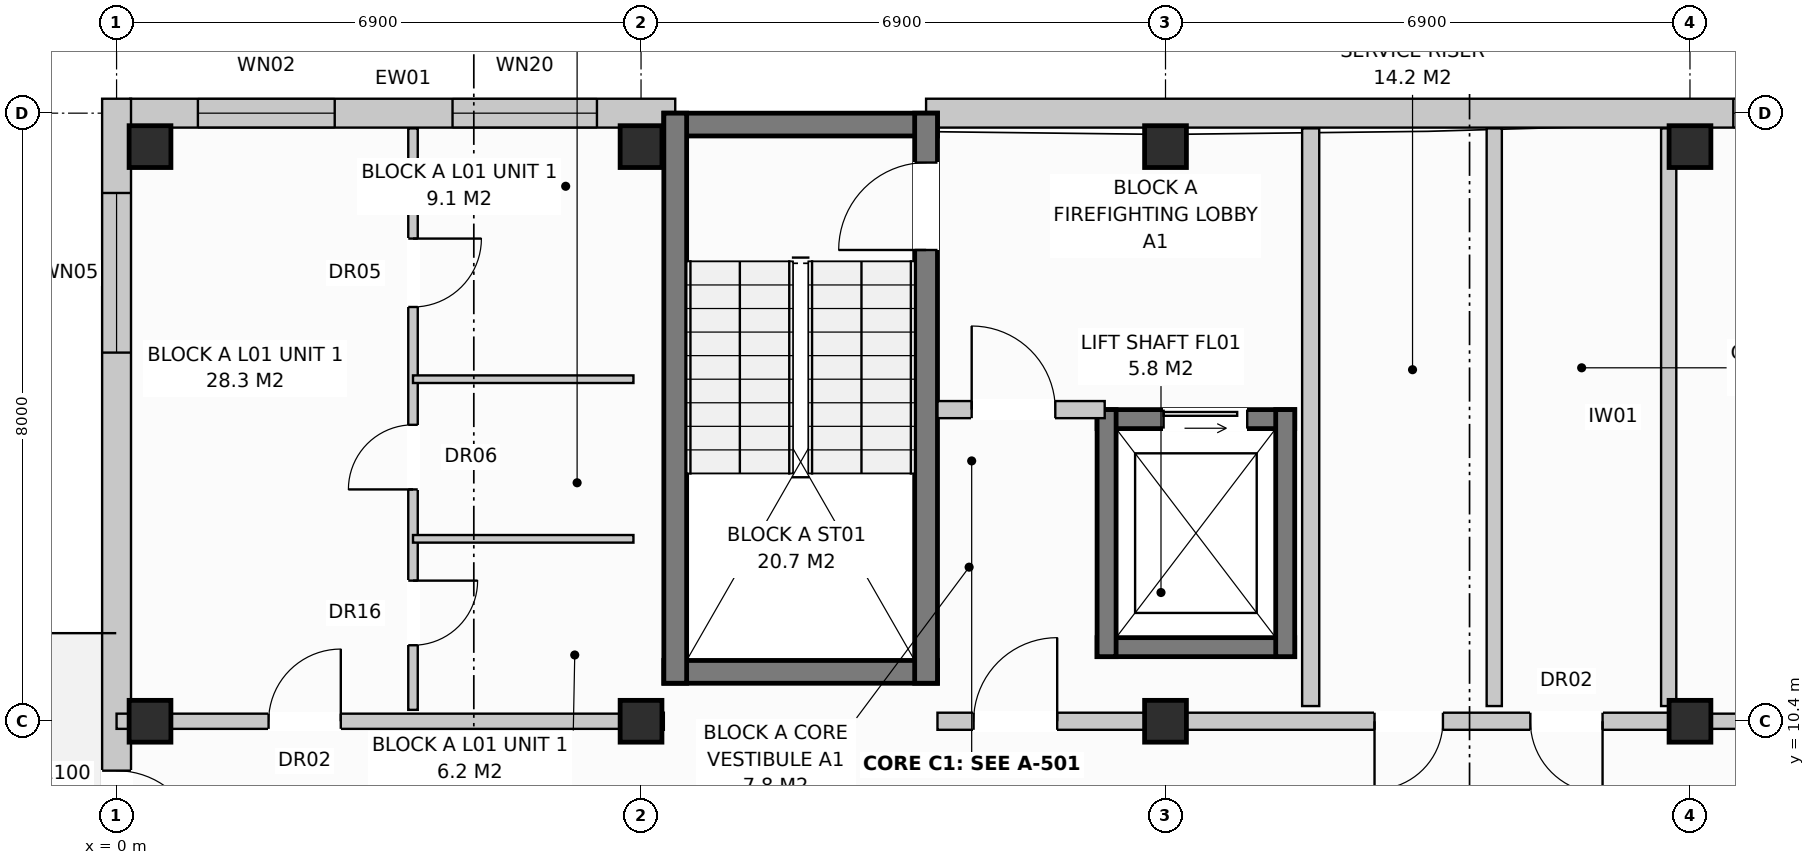
"""IFC4 building model, lengths in metres.
Left out: names, types, materials, properties, quantities, classifications, styles, units other than length and angle.
Written with IfcOpenShell. Run it as: python <this file> out.ifc"""

import sys

from ifc_helpers import new_model, si_unit, direction, frame, frame_2d, origin, origin_with_axes, origin_2d, place, context, subcontext, project, spatial, rectangle, extrude, element, fill, save


model = new_model("IFC4")
c1 = context("Model", 3, precision=1e-05, world=origin(), true_north=direction((0.0, 1.0)))
c2 = subcontext(c1, "Body", "Model", "MODEL_VIEW")
j1 = project(units=[si_unit("LENGTHUNIT", "METRE"), si_unit("PLANEANGLEUNIT", "RADIAN")], contexts=[c1])
p1 = place(None, origin())
s1 = spatial("IfcSite", under=j1, at=p1, CompositionType="ELEMENT")
p2 = place(p1, origin())
s2 = spatial("IfcBuilding", under=s1, at=p2, CompositionType="ELEMENT")
p3 = place(p2, frame((0.0, 0.0, 4.4)))
s3 = spatial("IfcBuildingStorey", under=s2, at=p3, CompositionType="ELEMENT", Elevation=4.4)
for number, where, z_axis, x_axis in (
    (1, (0.44, 10.4, 0.0), (0.0, 0.0, 1.0), (1.0, 0.0, 0.0)),
    (2, (0.44, 17.96, 0.0), (0.0, 0.0, 1.0), (1.0, 0.0, 0.0)),
    (3, (6.9, 10.4, 0.0), (0.0, 0.0, 1.0), (1.0, 0.0, 0.0)),
    (4, (6.9, 17.96, 0.0), (0.0, 0.0, 1.0), (1.0, 0.0, 0.0)),
    (5, (13.8, 10.4, 0.0), (0.0, 0.0, 1.0), (1.0, 0.0, 0.0)),
    (6, (13.8, 17.96, 0.0), (0.0, 0.0, 1.0), (1.0, 0.0, 0.0)),
    (7, (20.7, 10.4, 0.0), (0.0, 0.0, 1.0), (1.0, 0.0, 0.0)),
    (8, (20.7, 17.96, 0.0), (0.0, 0.0, 1.0), (1.0, 0.0, 0.0)),
):
    element("IfcColumn", number, at=place(p3, frame(where, z_axis=z_axis, x_axis=x_axis)), inside=s3, PredefinedType="COLUMN", context=c2, shape_type="SweptSolid", body=[
        extrude(rectangle(XDim=0.55, YDim=0.55, at=origin_2d()), origin(), (0.0, 0.0, 1.0), 3.6),
    ])
p4 = place(p3, frame((0.18, 18.4, 0.0), z_axis=(0.0, 0.0, 1.0), x_axis=(1.0, 0.0, 0.0)))
e9 = element("IfcWall", 9, at=p4, inside=s3, PredefinedType="STANDARD", context=c2, shape_type="SweptSolid", body=[
    extrude(rectangle(XDim=7.17, YDim=0.38, at=frame_2d((3.585, 0.0))), origin(), (0.0, 0.0, 1.0), 3.33),
])
p5 = place(p4, frame((0.89, 0.0, 0.8)))
e10 = element("IfcOpeningElement", 10, at=p5, cuts=e9, PredefinedType="OPENING", context=c2, shape_type="SweptSolid", body=[
    extrude(rectangle(XDim=1.8, YDim=1.7, at=frame_2d((0.9, 0.85))), frame((0.0, 0.202, 0.0), z_axis=(0.0, -1.0, 0.0), x_axis=(1.0, 0.0, 0.0)), (0.0, 0.0, 1.0), 0.404),
])
p6 = place(p4, frame((4.24, 0.0, 0.8)))
e11 = element("IfcOpeningElement", 11, at=p6, cuts=e9, PredefinedType="OPENING", context=c2, shape_type="SweptSolid", body=[
    extrude(rectangle(XDim=1.9, YDim=1.85, at=frame_2d((0.95, 0.925))), frame((0.0, 0.202, 0.0), z_axis=(0.0, -1.0, 0.0), x_axis=(1.0, 0.0, 0.0)), (0.0, 0.0, 1.0), 0.404),
])
p7 = place(p3, frame((10.65, 18.4, 0.0), z_axis=(0.0, 0.0, 1.0), x_axis=(1.0, 0.0, 0.0)))
e12 = element("IfcWall", 12, at=p7, inside=s3, PredefinedType="STANDARD", context=c2, shape_type="SweptSolid", body=[
    extrude(rectangle(XDim=17.4, YDim=0.38, at=frame_2d((8.7, 0.0))), origin(), (0.0, 0.0, 1.0), 3.33),
])
p8 = place(p7, frame((11.884, 0.0, 0.0)))
e13 = element("IfcOpeningElement", 13, at=p8, cuts=e12, PredefinedType="OPENING", context=c2, shape_type="SweptSolid", body=[
    extrude(rectangle(XDim=0.95, YDim=2.1, at=frame_2d((0.475, 1.05))), frame((0.0, 0.202, 0.0), z_axis=(0.0, -1.0, 0.0), x_axis=(1.0, 0.0, 0.0)), (0.0, 0.0, 1.0), 0.404),
])
p9 = place(p7, frame((10.62, 0.0, 0.9)))
e14 = element("IfcOpeningElement", 14, at=p9, cuts=e12, PredefinedType="OPENING", context=c2, shape_type="SweptSolid", body=[
    extrude(rectangle(XDim=0.95, YDim=1.55, at=frame_2d((0.475, 0.775))), frame((0.0, 0.202, 0.0), z_axis=(0.0, -1.0, 0.0), x_axis=(1.0, 0.0, 0.0)), (0.0, 0.0, 1.0), 0.404),
])
p10 = place(p7, frame((14.52, 0.0, 0.8)))
e15 = element("IfcOpeningElement", 15, at=p10, cuts=e12, PredefinedType="OPENING", context=c2, shape_type="SweptSolid", body=[
    extrude(rectangle(XDim=1.8, YDim=1.7, at=frame_2d((0.9, 0.85))), frame((0.0, 0.202, 0.0), z_axis=(0.0, -1.0, 0.0), x_axis=(1.0, 0.0, 0.0)), (0.0, 0.0, 1.0), 0.404),
])
p11 = place(p3, frame((0.0, -0.19, 0.0), z_axis=(0.0, 0.0, 1.0), x_axis=(0.0, 1.0, 0.0)))
e16 = element("IfcWall", 16, at=p11, inside=s3, PredefinedType="STANDARD", context=c2, shape_type="SweptSolid", body=[
    extrude(rectangle(XDim=18.78, YDim=0.38, at=frame_2d((9.39, 0.0))), origin(), (0.0, 0.0, 1.0), 3.33),
])
p12 = place(p11, frame((8.84, 0.0, 0.0)))
e17 = element("IfcOpeningElement", 17, at=p12, cuts=e16, PredefinedType="OPENING", context=c2, shape_type="SweptSolid", body=[
    extrude(rectangle(XDim=1.1, YDim=2.1, at=frame_2d((0.55, 1.05))), frame((0.0, 0.202, 0.0), z_axis=(0.0, -1.0, 0.0), x_axis=(1.0, 0.0, 0.0)), (0.0, 0.0, 1.0), 0.404),
])
p13 = place(p11, frame((1.24, 0.0, 0.72)))
e18 = element("IfcOpeningElement", 18, at=p13, cuts=e16, PredefinedType="OPENING", context=c2, shape_type="SweptSolid", body=[
    extrude(rectangle(XDim=2.1, YDim=1.9, at=frame_2d((1.05, 0.95))), frame((0.0, 0.202, 0.0), z_axis=(0.0, -1.0, 0.0), x_axis=(1.0, 0.0, 0.0)), (0.0, 0.0, 1.0), 0.404),
])
p14 = place(p11, frame((15.44, 0.0, 0.72)))
e19 = element("IfcOpeningElement", 19, at=p14, cuts=e16, PredefinedType="OPENING", context=c2, shape_type="SweptSolid", body=[
    extrude(rectangle(XDim=2.1, YDim=1.9, at=frame_2d((1.05, 0.95))), frame((0.0, 0.202, 0.0), z_axis=(0.0, -1.0, 0.0), x_axis=(1.0, 0.0, 0.0)), (0.0, 0.0, 1.0), 0.404),
])
for number, where, z_axis, x_axis in (
    (20, (7.2, 18.25, 0.0), (0.0, 0.0, 1.0), (1.0, 0.0, 0.0)),
    (21, (7.2, 11.05, 0.0), (0.0, 0.0, 1.0), (1.0, 0.0, 0.0)),
):
    element("IfcWall", number, at=place(p3, frame(where, z_axis=z_axis, x_axis=x_axis)), inside=s3, PredefinedType="SHEAR", context=c2, shape_type="SweptSolid", body=[
        extrude(rectangle(XDim=3.6, YDim=0.3, at=frame_2d((1.8, 0.0))), origin(), (0.0, 0.0, 1.0), 3.33),
    ])
p15 = place(p3, frame((7.35, 10.9, 0.0), z_axis=(0.0, 0.0, 1.0), x_axis=(0.0, 1.0, 0.0)))
e22 = element("IfcWall", 22, at=p15, inside=s3, PredefinedType="SHEAR", context=c2, shape_type="SweptSolid", body=[
    extrude(rectangle(XDim=7.5, YDim=0.3, at=frame_2d((3.75, 0.0))), origin(), (0.0, 0.0, 1.0), 3.33),
])
p16 = place(p3, frame((10.65, 10.9, 0.0), z_axis=(0.0, 0.0, 1.0), x_axis=(0.0, 1.0, 0.0)))
e23 = element("IfcWall", 23, at=p16, inside=s3, PredefinedType="SHEAR", context=c2, shape_type="SweptSolid", body=[
    extrude(rectangle(XDim=7.5, YDim=0.3, at=frame_2d((3.75, 0.0))), origin(), (0.0, 0.0, 1.0), 3.33),
])
p17 = place(p16, frame((5.7, 0.0, 0.0)))
e24 = element("IfcOpeningElement", 24, at=p17, cuts=e23, PredefinedType="OPENING", context=c2, shape_type="SweptSolid", body=[
    extrude(rectangle(XDim=1.15, YDim=2.15, at=frame_2d((0.575, 1.075))), frame((0.0, 0.162, 0.0), z_axis=(0.0, -1.0, 0.0), x_axis=(1.0, 0.0, 0.0)), (0.0, 0.0, 1.0), 0.324),
])
p18 = place(p3, frame((12.9, 14.375, 0.0), z_axis=(0.0, 0.0, 1.0), x_axis=(1.0, 0.0, 0.0)))
e25 = element("IfcWall", 25, at=p18, inside=s3, PredefinedType="SHEAR", context=c2, shape_type="SweptSolid", body=[
    extrude(rectangle(XDim=2.6, YDim=0.25, at=frame_2d((1.3, 0.0))), origin(), (0.0, 0.0, 1.0), 3.33),
])
p19 = place(p18, frame((0.875, 0.0, 0.0)))
e26 = element("IfcOpeningElement", 26, at=p19, cuts=e25, PredefinedType="OPENING", context=c2, shape_type="SweptSolid", body=[
    extrude(rectangle(XDim=1.1, YDim=2.1, at=frame_2d((0.55, 1.05))), frame((0.0, 0.137, 0.0), z_axis=(0.0, -1.0, 0.0), x_axis=(1.0, 0.0, 0.0)), (0.0, 0.0, 1.0), 0.274),
])
p20 = place(p3, frame((12.9, 11.375, 0.0), z_axis=(0.0, 0.0, 1.0), x_axis=(1.0, 0.0, 0.0)))
e27 = element("IfcWall", 27, at=p20, inside=s3, PredefinedType="SHEAR", context=c2, shape_type="SweptSolid", body=[
    extrude(rectangle(XDim=2.6, YDim=0.25, at=frame_2d((1.3, 0.0))), origin(), (0.0, 0.0, 1.0), 3.33),
])
for number, where, z_axis, x_axis in (
    (28, (13.025, 11.25, 0.0), (0.0, 0.0, 1.0), (0.0, 1.0, 0.0)),
    (29, (15.375, 11.25, 0.0), (0.0, 0.0, 1.0), (0.0, 1.0, 0.0)),
):
    element("IfcWall", number, at=place(p3, frame(where, z_axis=z_axis, x_axis=x_axis)), inside=s3, PredefinedType="SHEAR", context=c2, shape_type="SweptSolid", body=[
        extrude(rectangle(XDim=3.25, YDim=0.25, at=frame_2d((1.625, 0.0))), origin(), (0.0, 0.0, 1.0), 3.33),
    ])
p21 = place(p3, frame((15.71, 10.6, 0.0), z_axis=(0.0, 0.0, 1.0), x_axis=(0.0, 1.0, 0.0)))
e30 = element("IfcWall", 30, at=p21, inside=s3, PredefinedType="PARTITIONING", context=c2, shape_type="SweptSolid", body=[
    extrude(rectangle(XDim=7.6, YDim=0.225, at=frame_2d((3.8, 0.0))), origin(), (0.0, 0.0, 1.0), 2.99),
])
p22 = place(p3, frame((10.8, 14.5, 0.0), z_axis=(0.0, 0.0, 1.0), x_axis=(1.0, 0.0, 0.0)))
e31 = element("IfcWall", 31, at=p22, inside=s3, PredefinedType="PARTITIONING", context=c2, shape_type="SweptSolid", body=[
    extrude(rectangle(XDim=2.2, YDim=0.225, at=frame_2d((1.1, 0.0))), origin(), (0.0, 0.0, 1.0), 3.33),
])
p23 = place(p22, frame((0.45, 0.0, 0.0)))
e32 = element("IfcOpeningElement", 32, at=p23, cuts=e31, PredefinedType="OPENING", context=c2, shape_type="SweptSolid", body=[
    extrude(rectangle(XDim=1.1, YDim=2.15, at=frame_2d((0.55, 1.075))), frame((0.0, 0.125, 0.0), z_axis=(0.0, -1.0, 0.0), x_axis=(1.0, 0.0, 0.0)), (0.0, 0.0, 1.0), 0.249),
])
p24 = place(p3, frame((6.9, 10.4, 0.0), z_axis=(0.0, 0.0, 1.0), x_axis=(1.0, 0.0, 0.0)))
e33 = element("IfcWall", 33, at=p24, inside=s3, PredefinedType="PARTITIONING", context=c2, shape_type="SweptSolid", body=[
    extrude(rectangle(XDim=0.3, YDim=0.225, at=frame_2d((0.15, 0.0))), origin(), (0.0, 0.0, 1.0), 3.33),
])
for number, where, z_axis, x_axis in (
    (34, (18.125, 10.6, 0.0), (0.0, 0.0, 1.0), (0.0, 1.0, 0.0)),
    (35, (20.42, 10.6, 0.0), (0.0, 0.0, 1.0), (0.0, 1.0, 0.0)),
):
    element("IfcWall", number, at=place(p3, frame(where, z_axis=z_axis, x_axis=x_axis)), inside=s3, PredefinedType="PARTITIONING", context=c2, shape_type="SweptSolid", body=[
        extrude(rectangle(XDim=7.6, YDim=0.2, at=frame_2d((3.8, 0.0))), origin(), (0.0, 0.0, 1.0), 3.33),
    ])
p25 = place(p3, frame((10.8, 10.4, 0.0), z_axis=(0.0, 0.0, 1.0), x_axis=(1.0, 0.0, 0.0)))
e36 = element("IfcWall", 36, at=p25, inside=s3, PredefinedType="PARTITIONING", context=c2, shape_type="SweptSolid", body=[
    extrude(rectangle(XDim=9.9, YDim=0.225, at=frame_2d((4.95, 0.0))), origin(), (0.0, 0.0, 1.0), 2.77),
])
p26 = place(p25, frame((0.475, 0.0, 0.0)))
e37 = element("IfcOpeningElement", 37, at=p26, cuts=e36, PredefinedType="OPENING", context=c2, shape_type="SweptSolid", body=[
    extrude(rectangle(XDim=1.1, YDim=2.15, at=frame_2d((0.55, 1.075))), frame((0.0, 0.125, 0.0), z_axis=(0.0, -1.0, 0.0), x_axis=(1.0, 0.0, 0.0)), (0.0, 0.0, 1.0), 0.249),
])
p27 = place(p25, frame((5.75, 0.0, 0.0)))
e38 = element("IfcOpeningElement", 38, at=p27, cuts=e36, PredefinedType="OPENING", context=c2, shape_type="SweptSolid", body=[
    extrude(rectangle(XDim=0.9, YDim=2.1, at=frame_2d((0.45, 1.05))), frame((0.0, 0.125, 0.0), z_axis=(0.0, -1.0, 0.0), x_axis=(1.0, 0.0, 0.0)), (0.0, 0.0, 1.0), 0.249),
])
p28 = place(p25, frame((7.8, 0.0, 0.0)))
e39 = element("IfcOpeningElement", 39, at=p28, cuts=e36, PredefinedType="OPENING", context=c2, shape_type="SweptSolid", body=[
    extrude(rectangle(XDim=0.95, YDim=2.15, at=frame_2d((0.475, 1.075))), frame((0.0, 0.125, 0.0), z_axis=(0.0, -1.0, 0.0), x_axis=(1.0, 0.0, 0.0)), (0.0, 0.0, 1.0), 0.249),
])
p29 = place(p3, frame((0.0, 10.4, 0.0), z_axis=(0.0, 0.0, 1.0), x_axis=(1.0, 0.0, 0.0)))
e40 = element("IfcWall", 40, at=p29, inside=s3, PredefinedType="PARTITIONING", context=c2, shape_type="SweptSolid", body=[
    extrude(rectangle(XDim=6.9, YDim=0.2, at=frame_2d((3.45, 0.0))), origin(), (0.0, 0.0, 1.0), 2.77),
])
p30 = place(p29, frame((2.0, 0.0, 0.0)))
e41 = element("IfcOpeningElement", 41, at=p30, cuts=e40, PredefinedType="OPENING", context=c2, shape_type="SweptSolid", body=[
    extrude(rectangle(XDim=0.95, YDim=2.15, at=frame_2d((0.475, 1.075))), frame((0.0, 0.112, 0.0), z_axis=(0.0, -1.0, 0.0), x_axis=(1.0, 0.0, 0.0)), (0.0, 0.0, 1.0), 0.224),
])
p31 = place(p3, frame((3.9, 10.55, 0.0), z_axis=(0.0, 0.0, 1.0), x_axis=(0.0, 1.0, 0.0)))
e42 = element("IfcWall", 42, at=p31, inside=s3, PredefinedType="PARTITIONING", context=c2, shape_type="SweptSolid", body=[
    extrude(rectangle(XDim=7.65, YDim=0.125, at=frame_2d((3.825, 0.0))), origin(), (0.0, 0.0, 1.0), 3.33),
])
p32 = place(p31, frame((0.85, 0.0, 0.0)))
e43 = element("IfcOpeningElement", 43, at=p32, cuts=e42, PredefinedType="OPENING", context=c2, shape_type="SweptSolid", body=[
    extrude(rectangle(XDim=0.85, YDim=2.1, at=frame_2d((0.425, 1.05))), frame((0.0, 0.074, 0.0), z_axis=(0.0, -1.0, 0.0), x_axis=(1.0, 0.0, 0.0)), (0.0, 0.0, 1.0), 0.149),
])
p33 = place(p31, frame((2.9, 0.0, 0.0)))
e44 = element("IfcOpeningElement", 44, at=p33, cuts=e42, PredefinedType="OPENING", context=c2, shape_type="SweptSolid", body=[
    extrude(rectangle(XDim=0.85, YDim=2.05, at=frame_2d((0.425, 1.025))), frame((0.0, 0.074, 0.0), z_axis=(0.0, -1.0, 0.0), x_axis=(1.0, 0.0, 0.0)), (0.0, 0.0, 1.0), 0.149),
])
p34 = place(p31, frame((5.3, 0.0, 0.0)))
e45 = element("IfcOpeningElement", 45, at=p34, cuts=e42, PredefinedType="OPENING", context=c2, shape_type="SweptSolid", body=[
    extrude(rectangle(XDim=0.9, YDim=2.1, at=frame_2d((0.45, 1.05))), frame((0.0, 0.074, 0.0), z_axis=(0.0, -1.0, 0.0), x_axis=(1.0, 0.0, 0.0)), (0.0, 0.0, 1.0), 0.149),
])
for number, where, z_axis, x_axis in (
    (46, (3.9, 12.8, 0.0), (0.0, 0.0, 1.0), (1.0, 0.0, 0.0)),
    (47, (3.9, 14.9, 0.0), (0.0, 0.0, 1.0), (1.0, 0.0, 0.0)),
):
    element("IfcWall", number, at=place(p3, frame(where, z_axis=z_axis, x_axis=x_axis)), inside=s3, PredefinedType="PARTITIONING", context=c2, shape_type="SweptSolid", body=[
        extrude(rectangle(XDim=2.9, YDim=0.1, at=frame_2d((1.45, 0.0))), origin(), (0.0, 0.0, 1.0), 3.33),
    ])
p35 = place(p3, frame((20.7, 10.4, 0.0), z_axis=(0.0, 0.0, 1.0), x_axis=(1.0, 0.0, 0.0)))
e48 = element("IfcWall", 48, at=p35, inside=s3, PredefinedType="PARTITIONING", context=c2, shape_type="SweptSolid", body=[
    extrude(rectangle(XDim=6.9, YDim=0.2, at=frame_2d((3.45, 0.0))), origin(), (0.0, 0.0, 1.0), 2.77),
])
p36 = place(p35, frame((2.0, 0.0, 0.0)))
e49 = element("IfcOpeningElement", 49, at=p36, cuts=e48, PredefinedType="OPENING", context=c2, shape_type="SweptSolid", body=[
    extrude(rectangle(XDim=0.95, YDim=2.15, at=frame_2d((0.475, 1.075))), frame((0.0, 0.112, 0.0), z_axis=(0.0, -1.0, 0.0), x_axis=(1.0, 0.0, 0.0)), (0.0, 0.0, 1.0), 0.224),
])
p37 = place(p5, origin_with_axes())
e50 = element("IfcWindow", 50, at=p37, inside=s3, PartitioningType="SINGLE_PANEL", PredefinedType="WINDOW", context=c2, shape_type="SweptSolid", body=[
    extrude(rectangle(XDim=1.8, YDim=1.7, at=frame_2d((0.9, 0.85))), frame((0.0, 0.03, 0.0), z_axis=(0.0, -1.0, 0.0), x_axis=(1.0, 0.0, 0.0)), (0.0, 0.0, 1.0), 0.06),
])
fill(e10, e50)
p38 = place(p6, origin_with_axes())
e51 = element("IfcWindow", 51, at=p38, inside=s3, PartitioningType="SINGLE_PANEL", PredefinedType="WINDOW", context=c2, shape_type="SweptSolid", body=[
    extrude(rectangle(XDim=1.9, YDim=1.85, at=frame_2d((0.95, 0.925))), frame((0.0, 0.03, 0.0), z_axis=(0.0, -1.0, 0.0), x_axis=(1.0, 0.0, 0.0)), (0.0, 0.0, 1.0), 0.06),
])
fill(e11, e51)
p39 = place(p9, origin_with_axes())
e52 = element("IfcWindow", 52, at=p39, inside=s3, PartitioningType="SINGLE_PANEL", PredefinedType="WINDOW", context=c2, shape_type="SweptSolid", body=[
    extrude(rectangle(XDim=0.95, YDim=1.55, at=frame_2d((0.475, 0.775))), frame((0.0, 0.03, 0.0), z_axis=(0.0, -1.0, 0.0), x_axis=(1.0, 0.0, 0.0)), (0.0, 0.0, 1.0), 0.06),
])
fill(e14, e52)
p40 = place(p12, frame((1.1, 0.0, 0.0), z_axis=(0.0, 0.0, 1.0), x_axis=(-1.0, 0.0, 0.0)))
e53 = element("IfcDoor", 53, at=p40, inside=s3, OperationType="SINGLE_SWING_LEFT", PredefinedType="DOOR", context=c2, shape_type="SweptSolid", body=[
    extrude(rectangle(XDim=1.1, YDim=2.1, at=frame_2d((0.55, 1.05))), frame((0.0, 0.025, 0.0), z_axis=(0.0, -1.0, 0.0), x_axis=(1.0, 0.0, 0.0)), (0.0, 0.0, 1.0), 0.05),
])
fill(e17, e53)
p41 = place(p14, origin_with_axes())
e54 = element("IfcWindow", 54, at=p41, inside=s3, PartitioningType="SINGLE_PANEL", PredefinedType="WINDOW", context=c2, shape_type="SweptSolid", body=[
    extrude(rectangle(XDim=2.1, YDim=1.9, at=frame_2d((1.05, 0.95))), frame((0.0, 0.03, 0.0), z_axis=(0.0, -1.0, 0.0), x_axis=(1.0, 0.0, 0.0)), (0.0, 0.0, 1.0), 0.06),
])
fill(e19, e54)
p42 = place(p17, origin_with_axes())
e55 = element("IfcDoor", 55, at=p42, inside=s3, OperationType="SINGLE_SWING_LEFT", PredefinedType="DOOR", context=c2, shape_type="SweptSolid", body=[
    extrude(rectangle(XDim=1.15, YDim=2.15, at=frame_2d((0.575, 1.075))), frame((0.0, 0.025, 0.0), z_axis=(0.0, -1.0, 0.0), x_axis=(1.0, 0.0, 0.0)), (0.0, 0.0, 1.0), 0.05),
])
fill(e24, e55)
p43 = place(p19, origin_with_axes())
e56 = element("IfcDoor", 56, at=p43, inside=s3, OperationType="SLIDING_TO_LEFT", PredefinedType="DOOR", context=c2, shape_type="SweptSolid", body=[
    extrude(rectangle(XDim=1.1, YDim=2.1, at=frame_2d((0.55, 1.05))), frame((0.0, 0.025, 0.0), z_axis=(0.0, -1.0, 0.0), x_axis=(1.0, 0.0, 0.0)), (0.0, 0.0, 1.0), 0.05),
])
fill(e26, e56)
p44 = place(p23, origin_with_axes())
e57 = element("IfcDoor", 57, at=p44, inside=s3, OperationType="SINGLE_SWING_LEFT", PredefinedType="DOOR", context=c2, shape_type="SweptSolid", body=[
    extrude(rectangle(XDim=1.1, YDim=2.15, at=frame_2d((0.55, 1.075))), frame((0.0, 0.025, 0.0), z_axis=(0.0, -1.0, 0.0), x_axis=(1.0, 0.0, 0.0)), (0.0, 0.0, 1.0), 0.05),
])
fill(e32, e57)
p45 = place(p26, origin_with_axes())
e58 = element("IfcDoor", 58, at=p45, inside=s3, OperationType="SINGLE_SWING_RIGHT", PredefinedType="DOOR", context=c2, shape_type="SweptSolid", body=[
    extrude(rectangle(XDim=1.1, YDim=2.15, at=frame_2d((0.55, 1.075))), frame((0.0, 0.025, 0.0), z_axis=(0.0, -1.0, 0.0), x_axis=(1.0, 0.0, 0.0)), (0.0, 0.0, 1.0), 0.05),
])
fill(e37, e58)
p46 = place(p27, frame((0.9, 0.0, 0.0), z_axis=(0.0, 0.0, 1.0), x_axis=(-1.0, 0.0, 0.0)))
e59 = element("IfcDoor", 59, at=p46, inside=s3, OperationType="SINGLE_SWING_LEFT", PredefinedType="DOOR", context=c2, shape_type="SweptSolid", body=[
    extrude(rectangle(XDim=0.9, YDim=2.1, at=frame_2d((0.45, 1.05))), frame((0.0, 0.025, 0.0), z_axis=(0.0, -1.0, 0.0), x_axis=(1.0, 0.0, 0.0)), (0.0, 0.0, 1.0), 0.05),
])
fill(e38, e59)
p47 = place(p28, frame((0.95, 0.0, 0.0), z_axis=(0.0, 0.0, 1.0), x_axis=(-1.0, 0.0, 0.0)))
e60 = element("IfcDoor", 60, at=p47, inside=s3, OperationType="SINGLE_SWING_RIGHT", PredefinedType="DOOR", context=c2, shape_type="SweptSolid", body=[
    extrude(rectangle(XDim=0.95, YDim=2.15, at=frame_2d((0.475, 1.075))), frame((0.0, 0.025, 0.0), z_axis=(0.0, -1.0, 0.0), x_axis=(1.0, 0.0, 0.0)), (0.0, 0.0, 1.0), 0.05),
])
fill(e39, e60)
p48 = place(p30, origin_with_axes())
e61 = element("IfcDoor", 61, at=p48, inside=s3, OperationType="SINGLE_SWING_RIGHT", PredefinedType="DOOR", context=c2, shape_type="SweptSolid", body=[
    extrude(rectangle(XDim=0.95, YDim=2.15, at=frame_2d((0.475, 1.075))), frame((0.0, 0.025, 0.0), z_axis=(0.0, -1.0, 0.0), x_axis=(1.0, 0.0, 0.0)), (0.0, 0.0, 1.0), 0.05),
])
fill(e41, e61)
p49 = place(p32, frame((0.85, 0.0, 0.0), z_axis=(0.0, 0.0, 1.0), x_axis=(-1.0, 0.0, 0.0)))
e62 = element("IfcDoor", 62, at=p49, inside=s3, OperationType="SINGLE_SWING_RIGHT", PredefinedType="DOOR", context=c2, shape_type="SweptSolid", body=[
    extrude(rectangle(XDim=0.85, YDim=2.1, at=frame_2d((0.425, 1.05))), frame((0.0, 0.025, 0.0), z_axis=(0.0, -1.0, 0.0), x_axis=(1.0, 0.0, 0.0)), (0.0, 0.0, 1.0), 0.05),
])
fill(e43, e62)
p50 = place(p33, origin_with_axes())
e63 = element("IfcDoor", 63, at=p50, inside=s3, OperationType="SINGLE_SWING_LEFT", PredefinedType="DOOR", context=c2, shape_type="SweptSolid", body=[
    extrude(rectangle(XDim=0.85, YDim=2.05, at=frame_2d((0.425, 1.025))), frame((0.0, 0.025, 0.0), z_axis=(0.0, -1.0, 0.0), x_axis=(1.0, 0.0, 0.0)), (0.0, 0.0, 1.0), 0.05),
])
fill(e44, e63)
p51 = place(p34, frame((0.9, 0.0, 0.0), z_axis=(0.0, 0.0, 1.0), x_axis=(-1.0, 0.0, 0.0)))
e64 = element("IfcDoor", 64, at=p51, inside=s3, OperationType="SINGLE_SWING_RIGHT", PredefinedType="DOOR", context=c2, shape_type="SweptSolid", body=[
    extrude(rectangle(XDim=0.9, YDim=2.1, at=frame_2d((0.45, 1.05))), frame((0.0, 0.025, 0.0), z_axis=(0.0, -1.0, 0.0), x_axis=(1.0, 0.0, 0.0)), (0.0, 0.0, 1.0), 0.05),
])
fill(e45, e64)
save(model, sys.argv[1])
